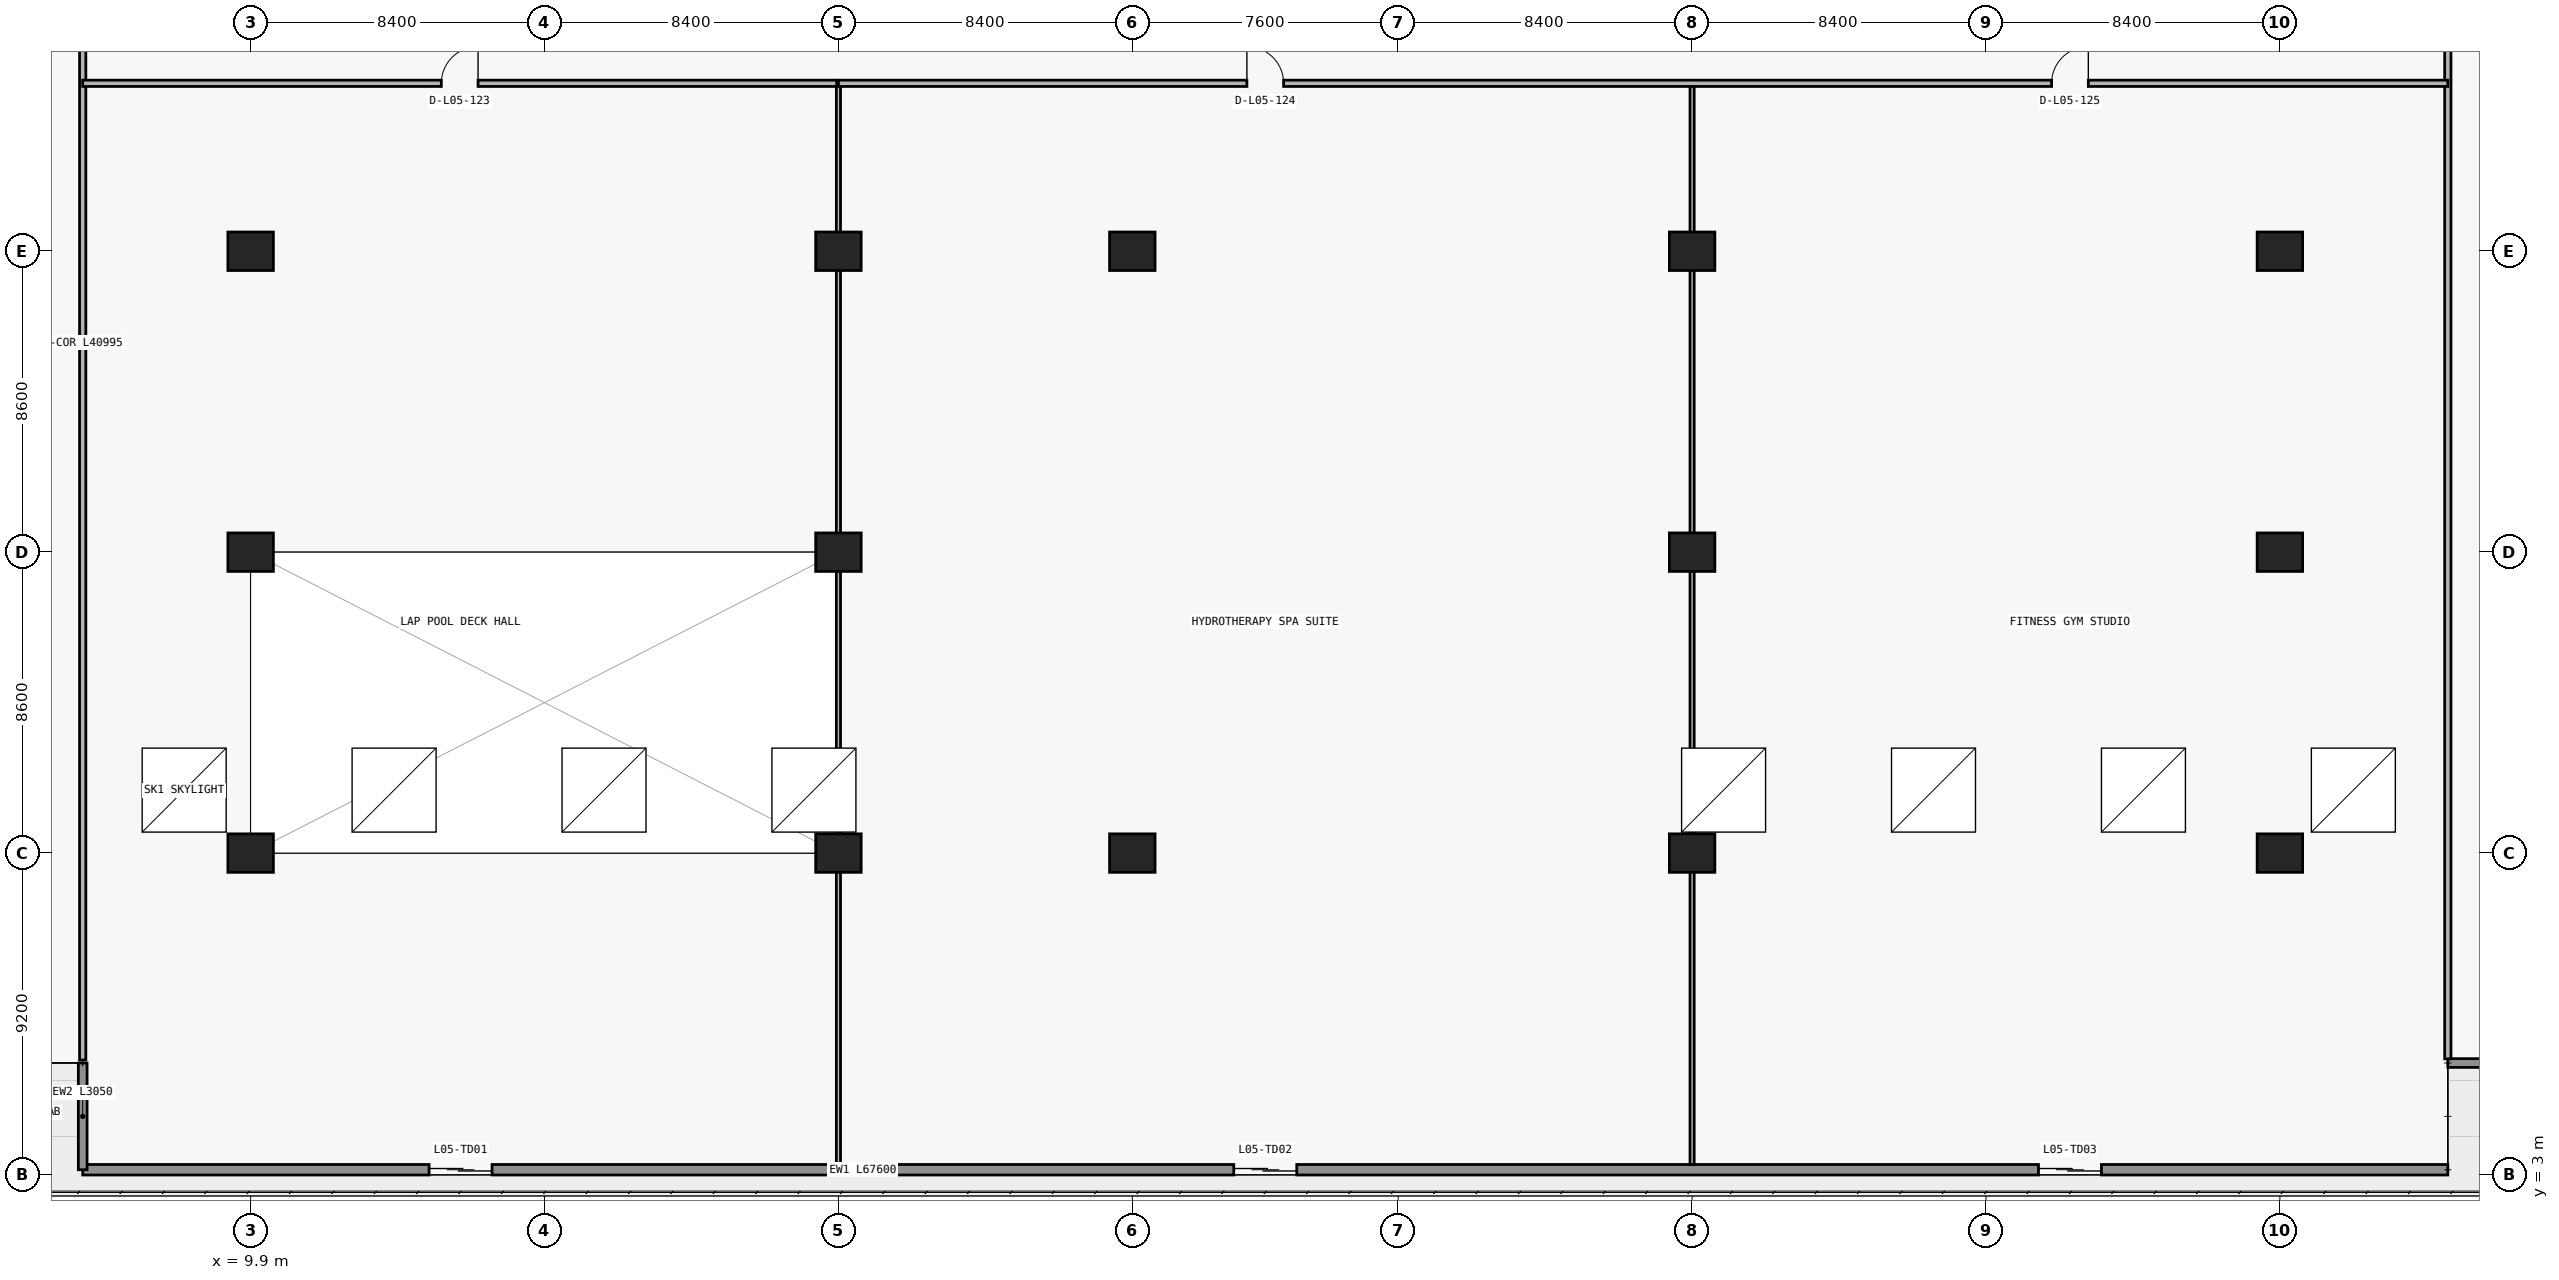
"""IFC4 building model, lengths in metres.
Left out: names, types, materials, properties, quantities, classifications, styles, units other than length and angle.
Written with IfcOpenShell. Run it as: python <this file> out.ifc"""

import sys

from ifc_helpers import new_model, si_unit, direction, frame, frame_2d, origin, origin_2d, place, context, subcontext, project, spatial, rectangle, extrude, element, fill, save


model = new_model("IFC4")
c1 = context("Model", 3, precision=1e-05, world=origin(), true_north=direction((0.0, 1.0)))
c2 = subcontext(c1, "Body", "Model", "MODEL_VIEW")
j1 = project(units=[si_unit("LENGTHUNIT", "METRE"), si_unit("PLANEANGLEUNIT", "RADIAN")], contexts=[c1])
p1 = place(None, origin())
s1 = spatial("IfcSite", under=j1, at=p1, CompositionType="ELEMENT")
p2 = place(p1, origin())
s2 = spatial("IfcBuilding", under=s1, at=p2, CompositionType="ELEMENT")
p3 = place(p2, frame((0.0, 0.0, 24.6)))
s3 = spatial("IfcBuildingStorey", under=s2, at=p3, CompositionType="ELEMENT", Elevation=24.6)
for number, where, z_axis, x_axis in (
    (1, (9.9, 12.2, 0.0), (0.0, 0.0, 1.0), (1.0, 0.0, 0.0)),
    (2, (26.7, 12.2, 0.0), (0.0, 0.0, 1.0), (1.0, 0.0, 0.0)),
    (3, (35.1, 12.2, 0.0), (0.0, 0.0, 1.0), (1.0, 0.0, 0.0)),
    (4, (51.1, 12.2, 0.0), (0.0, 0.0, 1.0), (1.0, 0.0, 0.0)),
    (5, (67.9, 12.2, 0.0), (0.0, 0.0, 1.0), (1.0, 0.0, 0.0)),
    (6, (9.9, 20.8, 0.0), (0.0, 0.0, 1.0), (1.0, 0.0, 0.0)),
    (7, (26.7, 20.8, 0.0), (0.0, 0.0, 1.0), (1.0, 0.0, 0.0)),
    (8, (51.1, 20.8, 0.0), (0.0, 0.0, 1.0), (1.0, 0.0, 0.0)),
    (9, (67.9, 20.8, 0.0), (0.0, 0.0, 1.0), (1.0, 0.0, 0.0)),
    (10, (9.9, 29.4, 0.0), (0.0, 0.0, 1.0), (1.0, 0.0, 0.0)),
    (11, (26.7, 29.4, 0.0), (0.0, 0.0, 1.0), (1.0, 0.0, 0.0)),
    (12, (35.1, 29.4, 0.0), (0.0, 0.0, 1.0), (1.0, 0.0, 0.0)),
    (13, (51.1, 29.4, 0.0), (0.0, 0.0, 1.0), (1.0, 0.0, 0.0)),
    (14, (67.9, 29.4, 0.0), (0.0, 0.0, 1.0), (1.0, 0.0, 0.0)),
):
    element("IfcColumn", number, at=place(p3, frame(where, z_axis=z_axis, x_axis=x_axis)), inside=s3, PredefinedType="COLUMN", context=c2, shape_type="SweptSolid", body=[
        extrude(rectangle(XDim=1.3, YDim=1.1, at=origin_2d()), origin(), (0.0, 0.0, 1.0), 5.15),
    ])
p4 = place(p3, frame((72.7, 3.15, 0.0), z_axis=(0.0, 0.0, 1.0), x_axis=(-1.0, 0.0, 0.0)))
e15 = element("IfcWall", 15, at=p4, inside=s3, PredefinedType="STANDARD", context=c2, shape_type="SweptSolid", body=[
    extrude(rectangle(XDim=67.6, YDim=0.3, at=frame_2d((33.8, 0.0))), origin(), (0.0, 0.0, 1.0), 5.15),
])
p5 = place(p4, frame((55.9, 0.0, 0.0)))
e16 = element("IfcOpeningElement", 16, at=p5, cuts=e15, PredefinedType="OPENING", context=c2, shape_type="SweptSolid", body=[
    extrude(rectangle(XDim=1.8, YDim=2.3, at=frame_2d((0.9, 1.15))), frame((0.0, 0.16, 0.0), z_axis=(0.0, -1.0, 0.0), x_axis=(1.0, 0.0, 0.0)), (0.0, 0.0, 1.0), 0.32),
])
p6 = place(p4, frame((32.9, 0.0, 0.0)))
e17 = element("IfcOpeningElement", 17, at=p6, cuts=e15, PredefinedType="OPENING", context=c2, shape_type="SweptSolid", body=[
    extrude(rectangle(XDim=1.8, YDim=2.3, at=frame_2d((0.9, 1.15))), frame((0.0, 0.16, 0.0), z_axis=(0.0, -1.0, 0.0), x_axis=(1.0, 0.0, 0.0)), (0.0, 0.0, 1.0), 0.32),
])
p7 = place(p4, frame((9.9, 0.0, 0.0)))
e18 = element("IfcOpeningElement", 18, at=p7, cuts=e15, PredefinedType="OPENING", context=c2, shape_type="SweptSolid", body=[
    extrude(rectangle(XDim=1.8, YDim=2.3, at=frame_2d((0.9, 1.15))), frame((0.0, 0.16, 0.0), z_axis=(0.0, -1.0, 0.0), x_axis=(1.0, 0.0, 0.0)), (0.0, 0.0, 1.0), 0.32),
])
p8 = place(p3, frame((5.1, 6.2, 0.0), z_axis=(0.0, 0.0, 1.0), x_axis=(0.0, -1.0, 0.0)))
e19 = element("IfcWall", 19, at=p8, inside=s3, PredefinedType="ELEMENTEDWALL", context=c2, shape_type="SweptSolid", body=[
    extrude(rectangle(XDim=3.05, YDim=0.25, at=frame_2d((1.525, 0.0))), origin(), (0.0, 0.0, 1.0), 5.15),
])
p9 = place(p3, frame((72.7, 6.2, 0.0), z_axis=(0.0, 0.0, 1.0), x_axis=(1.0, 0.0, 0.0)))
e20 = element("IfcWall", 20, at=p9, inside=s3, PredefinedType="ELEMENTEDWALL", context=c2, shape_type="SweptSolid", body=[
    extrude(rectangle(XDim=3.45, YDim=0.25, at=frame_2d((1.725, 0.0))), origin(), (0.0, 0.0, 1.0), 5.15),
])
p10 = place(p3, frame((5.1, 6.285, 0.0), z_axis=(0.0, 0.0, 1.0), x_axis=(0.0, 1.0, 0.0)))
e21 = element("IfcWall", 21, at=p10, inside=s3, PredefinedType="PARTITIONING", context=c2, shape_type="SweptSolid", body=[
    extrude(rectangle(XDim=40.995, YDim=0.18, at=frame_2d((20.498, 0.0))), origin(), (0.0, 0.0, 1.0), 5.15),
])
for number, where, z_axis, x_axis in (
    (22, (26.7, 3.295, 0.0), (0.0, 0.0, 1.0), (0.0, 1.0, 0.0)),
    (23, (51.1, 3.295, 0.0), (0.0, 0.0, 1.0), (0.0, 1.0, 0.0)),
):
    element("IfcWall", number, at=place(p3, frame(where, z_axis=z_axis, x_axis=x_axis)), inside=s3, PredefinedType="PARTITIONING", context=c2, shape_type="SweptSolid", body=[
        extrude(rectangle(XDim=30.905, YDim=0.12, at=frame_2d((15.453, 0.0))), origin(), (0.0, 0.0, 1.0), 3.335),
    ])
p11 = place(p3, frame((72.7, 6.32, 0.0), z_axis=(0.0, 0.0, 1.0), x_axis=(0.0, 1.0, 0.0)))
e24 = element("IfcWall", 24, at=p11, inside=s3, PredefinedType="PARTITIONING", context=c2, shape_type="SweptSolid", body=[
    extrude(rectangle(XDim=40.96, YDim=0.18, at=frame_2d((20.48, 0.0))), origin(), (0.0, 0.0, 1.0), 5.15),
])
p12 = place(p3, frame((5.1, 34.2, 0.0), z_axis=(0.0, 0.0, 1.0), x_axis=(1.0, 0.0, 0.0)))
e25 = element("IfcWall", 25, at=p12, inside=s3, PredefinedType="PARTITIONING", context=c2, shape_type="SweptSolid", body=[
    extrude(rectangle(XDim=21.55, YDim=0.18, at=frame_2d((10.775, 0.0))), origin(), (0.0, 0.0, 1.0), 5.15),
])
p13 = place(p12, frame((10.25, 0.0, 0.0)))
e26 = element("IfcOpeningElement", 26, at=p13, cuts=e25, PredefinedType="OPENING", context=c2, shape_type="SweptSolid", body=[
    extrude(rectangle(XDim=1.05, YDim=2.15, at=frame_2d((0.525, 1.075))), frame((0.0, 0.1, 0.0), z_axis=(0.0, -1.0, 0.0), x_axis=(1.0, 0.0, 0.0)), (0.0, 0.0, 1.0), 0.2),
])
p14 = place(p3, frame((26.7, 34.2, 0.0), z_axis=(0.0, 0.0, 1.0), x_axis=(1.0, 0.0, 0.0)))
e27 = element("IfcWall", 27, at=p14, inside=s3, PredefinedType="PARTITIONING", context=c2, shape_type="SweptSolid", body=[
    extrude(rectangle(XDim=46.0, YDim=0.18, at=frame_2d((23.0, 0.0))), origin(), (0.0, 0.0, 1.0), 5.15),
])
p15 = place(p14, frame((11.675, 0.0, 0.0)))
e28 = element("IfcOpeningElement", 28, at=p15, cuts=e27, PredefinedType="OPENING", context=c2, shape_type="SweptSolid", body=[
    extrude(rectangle(XDim=1.05, YDim=2.15, at=frame_2d((0.525, 1.075))), frame((0.0, 0.1, 0.0), z_axis=(0.0, -1.0, 0.0), x_axis=(1.0, 0.0, 0.0)), (0.0, 0.0, 1.0), 0.2),
])
p16 = place(p14, frame((34.675, 0.0, 0.0)))
e29 = element("IfcOpeningElement", 29, at=p16, cuts=e27, PredefinedType="OPENING", context=c2, shape_type="SweptSolid", body=[
    extrude(rectangle(XDim=1.05, YDim=2.15, at=frame_2d((0.525, 1.075))), frame((0.0, 0.1, 0.0), z_axis=(0.0, -1.0, 0.0), x_axis=(1.0, 0.0, 0.0)), (0.0, 0.0, 1.0), 0.2),
])
p17 = place(p5, origin())
e30 = element("IfcDoor", 30, at=p17, inside=s3, OperationType="DOUBLE_DOOR_SLIDING", PredefinedType="DOOR", context=c2, shape_type="SweptSolid", body=[
    extrude(rectangle(XDim=1.8, YDim=2.3, at=frame_2d((0.9, 1.15))), frame((0.0, 0.025, 0.0), z_axis=(0.0, -1.0, 0.0), x_axis=(1.0, 0.0, 0.0)), (0.0, 0.0, 1.0), 0.05),
])
fill(e16, e30)
p18 = place(p6, origin())
e31 = element("IfcDoor", 31, at=p18, inside=s3, OperationType="DOUBLE_DOOR_SLIDING", PredefinedType="DOOR", context=c2, shape_type="SweptSolid", body=[
    extrude(rectangle(XDim=1.8, YDim=2.3, at=frame_2d((0.9, 1.15))), frame((0.0, 0.025, 0.0), z_axis=(0.0, -1.0, 0.0), x_axis=(1.0, 0.0, 0.0)), (0.0, 0.0, 1.0), 0.05),
])
fill(e17, e31)
p19 = place(p7, origin())
e32 = element("IfcDoor", 32, at=p19, inside=s3, OperationType="DOUBLE_DOOR_SLIDING", PredefinedType="DOOR", context=c2, shape_type="SweptSolid", body=[
    extrude(rectangle(XDim=1.8, YDim=2.3, at=frame_2d((0.9, 1.15))), frame((0.0, 0.025, 0.0), z_axis=(0.0, -1.0, 0.0), x_axis=(1.0, 0.0, 0.0)), (0.0, 0.0, 1.0), 0.05),
])
fill(e18, e32)
p20 = place(p3, frame((0.0, 0.0, -0.35)))
p21 = place(p20, frame((8.0, 14.0, 0.0)))
p22 = place(p21, frame((0.0, 0.0, 0.3)))
e33 = element("IfcWindow", 33, at=p22, inside=s3, PartitioningType="SINGLE_PANEL", PredefinedType="SKYLIGHT", context=c2, shape_type="SweptSolid", body=[
    extrude(rectangle(XDim=2.4, YDim=2.4, at=origin_2d()), origin(), (0.0, 0.0, 1.0), 0.05),
])
p23 = place(p20, frame((14.0, 14.0, 0.0)))
p24 = place(p23, frame((0.0, 0.0, 0.3)))
e34 = element("IfcWindow", 34, at=p24, inside=s3, PartitioningType="SINGLE_PANEL", PredefinedType="SKYLIGHT", context=c2, shape_type="SweptSolid", body=[
    extrude(rectangle(XDim=2.4, YDim=2.4, at=origin_2d()), origin(), (0.0, 0.0, 1.0), 0.05),
])
p25 = place(p20, frame((20.0, 14.0, 0.0)))
p26 = place(p25, frame((0.0, 0.0, 0.3)))
e35 = element("IfcWindow", 35, at=p26, inside=s3, PartitioningType="SINGLE_PANEL", PredefinedType="SKYLIGHT", context=c2, shape_type="SweptSolid", body=[
    extrude(rectangle(XDim=2.4, YDim=2.4, at=origin_2d()), origin(), (0.0, 0.0, 1.0), 0.05),
])
p27 = place(p20, frame((26.0, 14.0, 0.0)))
p28 = place(p27, frame((0.0, 0.0, 0.3)))
e36 = element("IfcWindow", 36, at=p28, inside=s3, PartitioningType="SINGLE_PANEL", PredefinedType="SKYLIGHT", context=c2, shape_type="SweptSolid", body=[
    extrude(rectangle(XDim=2.4, YDim=2.4, at=origin_2d()), origin(), (0.0, 0.0, 1.0), 0.05),
])
p29 = place(p20, frame((52.0, 14.0, 0.0)))
p30 = place(p29, frame((0.0, 0.0, 0.3)))
e37 = element("IfcWindow", 37, at=p30, inside=s3, PartitioningType="SINGLE_PANEL", PredefinedType="SKYLIGHT", context=c2, shape_type="SweptSolid", body=[
    extrude(rectangle(XDim=2.4, YDim=2.4, at=origin_2d()), origin(), (0.0, 0.0, 1.0), 0.05),
])
p31 = place(p20, frame((58.0, 14.0, 0.0)))
p32 = place(p31, frame((0.0, 0.0, 0.3)))
e38 = element("IfcWindow", 38, at=p32, inside=s3, PartitioningType="SINGLE_PANEL", PredefinedType="SKYLIGHT", context=c2, shape_type="SweptSolid", body=[
    extrude(rectangle(XDim=2.4, YDim=2.4, at=origin_2d()), origin(), (0.0, 0.0, 1.0), 0.05),
])
p33 = place(p20, frame((64.0, 14.0, 0.0)))
p34 = place(p33, frame((0.0, 0.0, 0.3)))
e39 = element("IfcWindow", 39, at=p34, inside=s3, PartitioningType="SINGLE_PANEL", PredefinedType="SKYLIGHT", context=c2, shape_type="SweptSolid", body=[
    extrude(rectangle(XDim=2.4, YDim=2.4, at=origin_2d()), origin(), (0.0, 0.0, 1.0), 0.05),
])
p35 = place(p20, frame((70.0, 14.0, 0.0)))
p36 = place(p35, frame((0.0, 0.0, 0.3)))
e40 = element("IfcWindow", 40, at=p36, inside=s3, PartitioningType="SINGLE_PANEL", PredefinedType="SKYLIGHT", context=c2, shape_type="SweptSolid", body=[
    extrude(rectangle(XDim=2.4, YDim=2.4, at=origin_2d()), origin(), (0.0, 0.0, 1.0), 0.05),
])
p37 = place(p13, origin())
e41 = element("IfcDoor", 41, at=p37, inside=s3, OperationType="SINGLE_SWING_RIGHT", PredefinedType="DOOR", context=c2, shape_type="SweptSolid", body=[
    extrude(rectangle(XDim=1.05, YDim=2.15, at=frame_2d((0.525, 1.075))), frame((0.0, 0.025, 0.0), z_axis=(0.0, -1.0, 0.0), x_axis=(1.0, 0.0, 0.0)), (0.0, 0.0, 1.0), 0.05),
])
fill(e26, e41)
p38 = place(p15, origin())
e42 = element("IfcDoor", 42, at=p38, inside=s3, OperationType="SINGLE_SWING_LEFT", PredefinedType="DOOR", context=c2, shape_type="SweptSolid", body=[
    extrude(rectangle(XDim=1.05, YDim=2.15, at=frame_2d((0.525, 1.075))), frame((0.0, 0.025, 0.0), z_axis=(0.0, -1.0, 0.0), x_axis=(1.0, 0.0, 0.0)), (0.0, 0.0, 1.0), 0.05),
])
fill(e28, e42)
p39 = place(p16, origin())
e43 = element("IfcDoor", 43, at=p39, inside=s3, OperationType="SINGLE_SWING_RIGHT", PredefinedType="DOOR", context=c2, shape_type="SweptSolid", body=[
    extrude(rectangle(XDim=1.05, YDim=2.15, at=frame_2d((0.525, 1.075))), frame((0.0, 0.025, 0.0), z_axis=(0.0, -1.0, 0.0), x_axis=(1.0, 0.0, 0.0)), (0.0, 0.0, 1.0), 0.05),
])
fill(e29, e43)
save(model, sys.argv[1])
